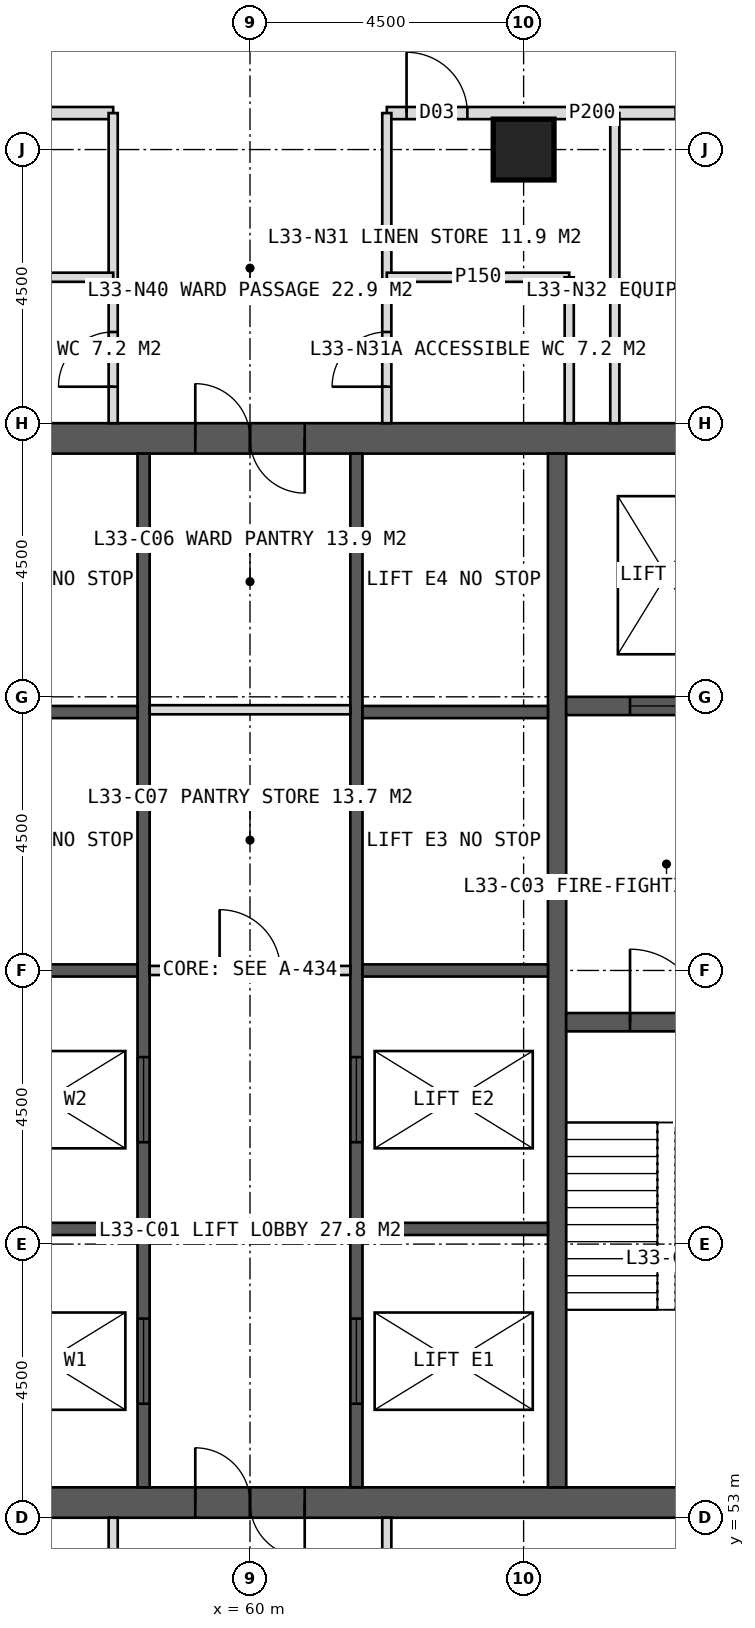
"""IFC4 building model, lengths in metres.
Left out: names, types, materials, properties, quantities, classifications, styles, units other than length and angle.
Written with IfcOpenShell. Run it as: python <this file> out.ifc"""

import sys

from ifc_helpers import new_model, si_unit, direction, frame, frame_2d, origin, origin_2d, place, context, subcontext, project, spatial, rectangle, hollow_rectangle, extrude, element, fill, save


model = new_model("IFC4")
c1 = context("Model", 3, precision=1e-05, world=origin(), true_north=direction((0.0, 1.0)))
c2 = subcontext(c1, "Body", "Model", "MODEL_VIEW")
j1 = project(units=[si_unit("LENGTHUNIT", "METRE"), si_unit("PLANEANGLEUNIT", "RADIAN")], contexts=[c1])
p1 = place(None, origin())
s1 = spatial("IfcSite", under=j1, at=p1, CompositionType="ELEMENT")
p2 = place(p1, origin())
s2 = spatial("IfcBuilding", under=s1, at=p2, CompositionType="ELEMENT")
p3 = place(p2, frame((0.0, 0.0, 140.0)))
s3 = spatial("IfcBuildingStorey", under=s2, at=p3, CompositionType="ELEMENT", Elevation=140.0)
p4 = place(p3, frame((51.0, 70.75, 0.0), z_axis=(0.0, 0.0, 1.0), x_axis=(1.0, 0.0, 0.0)))
e1 = element("IfcWall", 1, at=p4, inside=s3, PredefinedType="SHEAR", context=c2, shape_type="SweptSolid", body=[
    extrude(rectangle(XDim=18.0, YDim=0.5, at=frame_2d((9.0, 0.0))), origin(), (0.0, 0.0, 1.0), 4.0),
])
p5 = place(p4, frame((8.1, 0.0, 0.0)))
e2 = element("IfcOpeningElement", 2, at=p5, cuts=e1, PredefinedType="OPENING", context=c2, shape_type="SweptSolid", body=[
    extrude(rectangle(XDim=1.8, YDim=2.2, at=frame_2d((0.9, 1.1))), frame((0.0, 0.26, 0.0), z_axis=(0.0, -1.0, 0.0), x_axis=(1.0, 0.0, 0.0)), (0.0, 0.0, 1.0), 0.52),
])
p6 = place(p3, frame((51.0, 53.25, 0.0), z_axis=(0.0, 0.0, 1.0), x_axis=(1.0, 0.0, 0.0)))
e3 = element("IfcWall", 3, at=p6, inside=s3, PredefinedType="SHEAR", context=c2, shape_type="SweptSolid", body=[
    extrude(rectangle(XDim=18.0, YDim=0.5, at=frame_2d((9.0, 0.0))), origin(), (0.0, 0.0, 1.0), 4.0),
])
p7 = place(p6, frame((8.1, 0.0, 0.0)))
e4 = element("IfcOpeningElement", 4, at=p7, cuts=e3, PredefinedType="OPENING", context=c2, shape_type="SweptSolid", body=[
    extrude(rectangle(XDim=1.8, YDim=2.2, at=frame_2d((0.9, 1.1))), frame((0.0, 0.26, 0.0), z_axis=(0.0, -1.0, 0.0), x_axis=(1.0, 0.0, 0.0)), (0.0, 0.0, 1.0), 0.52),
])
p8 = place(p3, frame((65.05, 53.5, 0.0), z_axis=(0.0, 0.0, 1.0), x_axis=(0.0, 1.0, 0.0)))
e5 = element("IfcWall", 5, at=p8, inside=s3, PredefinedType="SHEAR", context=c2, shape_type="SweptSolid", body=[
    extrude(rectangle(XDim=17.0, YDim=0.3, at=frame_2d((8.5, 0.0))), origin(), (0.0, 0.0, 1.0), 4.0),
])
p9 = place(p3, frame((58.25, 53.5, 0.0), z_axis=(0.0, 0.0, 1.0), x_axis=(0.0, 1.0, 0.0)))
e6 = element("IfcWall", 6, at=p9, inside=s3, PredefinedType="SHEAR", context=c2, shape_type="SweptSolid", body=[
    extrude(rectangle(XDim=17.0, YDim=0.2, at=frame_2d((8.5, 0.0))), origin(), (0.0, 0.0, 1.0), 4.0),
])
p10 = place(p9, frame((1.375, 0.0, 0.0)))
e7 = element("IfcOpeningElement", 7, at=p10, cuts=e6, PredefinedType="OPENING", context=c2, shape_type="SweptSolid", body=[
    extrude(rectangle(XDim=1.4, YDim=2.2, at=frame_2d((0.7, 1.1))), frame((0.0, 0.11, 0.0), z_axis=(0.0, -1.0, 0.0), x_axis=(1.0, 0.0, 0.0)), (0.0, 0.0, 1.0), 0.22),
])
p11 = place(p9, frame((5.675, 0.0, 0.0)))
e8 = element("IfcOpeningElement", 8, at=p11, cuts=e6, PredefinedType="OPENING", context=c2, shape_type="SweptSolid", body=[
    extrude(rectangle(XDim=1.4, YDim=2.2, at=frame_2d((0.7, 1.1))), frame((0.0, 0.11, 0.0), z_axis=(0.0, -1.0, 0.0), x_axis=(1.0, 0.0, 0.0)), (0.0, 0.0, 1.0), 0.22),
])
p12 = place(p3, frame((61.75, 53.5, 0.0), z_axis=(0.0, 0.0, 1.0), x_axis=(0.0, 1.0, 0.0)))
e9 = element("IfcWall", 9, at=p12, inside=s3, PredefinedType="SHEAR", context=c2, shape_type="SweptSolid", body=[
    extrude(rectangle(XDim=17.0, YDim=0.2, at=frame_2d((8.5, 0.0))), origin(), (0.0, 0.0, 1.0), 4.0),
])
p13 = place(p12, frame((1.375, 0.0, 0.0)))
e10 = element("IfcOpeningElement", 10, at=p13, cuts=e9, PredefinedType="OPENING", context=c2, shape_type="SweptSolid", body=[
    extrude(rectangle(XDim=1.4, YDim=2.2, at=frame_2d((0.7, 1.1))), frame((0.0, 0.11, 0.0), z_axis=(0.0, -1.0, 0.0), x_axis=(1.0, 0.0, 0.0)), (0.0, 0.0, 1.0), 0.22),
])
p14 = place(p12, frame((5.675, 0.0, 0.0)))
e11 = element("IfcOpeningElement", 11, at=p14, cuts=e9, PredefinedType="OPENING", context=c2, shape_type="SweptSolid", body=[
    extrude(rectangle(XDim=1.4, YDim=2.2, at=frame_2d((0.7, 1.1))), frame((0.0, 0.11, 0.0), z_axis=(0.0, -1.0, 0.0), x_axis=(1.0, 0.0, 0.0)), (0.0, 0.0, 1.0), 0.22),
])
for number, where, z_axis, x_axis in (
    (12, (55.1, 57.75, 0.0), (0.0, 0.0, 1.0), (1.0, 0.0, 0.0)),
    (13, (61.85, 57.75, 0.0), (0.0, 0.0, 1.0), (1.0, 0.0, 0.0)),
    (14, (55.1, 62.0, 0.0), (0.0, 0.0, 1.0), (1.0, 0.0, 0.0)),
    (15, (61.85, 62.0, 0.0), (0.0, 0.0, 1.0), (1.0, 0.0, 0.0)),
    (16, (55.1, 66.25, 0.0), (0.0, 0.0, 1.0), (1.0, 0.0, 0.0)),
    (17, (61.85, 66.25, 0.0), (0.0, 0.0, 1.0), (1.0, 0.0, 0.0)),
):
    element("IfcWall", number, at=place(p3, frame(where, z_axis=z_axis, x_axis=x_axis)), inside=s3, PredefinedType="SHEAR", context=c2, shape_type="SweptSolid", body=[
        extrude(rectangle(XDim=3.05, YDim=0.2, at=frame_2d((1.525, 0.0))), origin(), (0.0, 0.0, 1.0), 4.0),
    ])
p15 = place(p3, frame((65.2, 61.15, 0.0), z_axis=(0.0, 0.0, 1.0), x_axis=(1.0, 0.0, 0.0)))
e18 = element("IfcWall", 18, at=p15, inside=s3, PredefinedType="SHEAR", context=c2, shape_type="SweptSolid", body=[
    extrude(rectangle(XDim=3.3, YDim=0.3, at=frame_2d((1.65, 0.0))), origin(), (0.0, 0.0, 1.0), 4.0),
])
p16 = place(p15, frame((1.05, 0.0, 0.0)))
e19 = element("IfcOpeningElement", 19, at=p16, cuts=e18, PredefinedType="OPENING", context=c2, shape_type="SweptSolid", body=[
    extrude(rectangle(XDim=1.2, YDim=2.1, at=frame_2d((0.6, 1.05))), frame((0.0, 0.16, 0.0), z_axis=(0.0, -1.0, 0.0), x_axis=(1.0, 0.0, 0.0)), (0.0, 0.0, 1.0), 0.32),
])
p17 = place(p3, frame((65.2, 66.35, 0.0), z_axis=(0.0, 0.0, 1.0), x_axis=(1.0, 0.0, 0.0)))
e20 = element("IfcWall", 20, at=p17, inside=s3, PredefinedType="SHEAR", context=c2, shape_type="SweptSolid", body=[
    extrude(rectangle(XDim=3.3, YDim=0.3, at=frame_2d((1.65, 0.0))), origin(), (0.0, 0.0, 1.0), 4.0),
])
p18 = place(p17, frame((1.05, 0.0, 0.0)))
e21 = element("IfcOpeningElement", 21, at=p18, cuts=e20, PredefinedType="OPENING", context=c2, shape_type="SweptSolid", body=[
    extrude(rectangle(XDim=1.2, YDim=2.2, at=frame_2d((0.6, 1.1))), frame((0.0, 0.16, 0.0), z_axis=(0.0, -1.0, 0.0), x_axis=(1.0, 0.0, 0.0)), (0.0, 0.0, 1.0), 0.32),
])
p19 = place(p3, frame((64.5, 75.5, 0.0), z_axis=(0.0, 0.0, 1.0), x_axis=(1.0, 0.0, 0.0)))
e22 = element("IfcColumn", 22, at=p19, inside=s3, PredefinedType="COLUMN", context=c2, shape_type="SweptSolid", body=[
    extrude(hollow_rectangle(XDim=1.0, YDim=1.0, WallThickness=0.1, at=origin_2d()), origin(), (0.0, 0.0, 1.0), 4.0),
])
p20 = place(p3, frame((45.9, 76.1, 0.0), z_axis=(0.0, 0.0, 1.0), x_axis=(1.0, 0.0, 0.0)))
e23 = element("IfcWall", 23, at=p20, inside=s3, PredefinedType="PARTITIONING", context=c2, shape_type="SweptSolid", body=[
    extrude(rectangle(XDim=11.85, YDim=0.2, at=frame_2d((5.925, 0.0))), origin(), (0.0, 0.0, 1.0), 3.75),
])
p21 = place(p20, frame((6.55, 0.0, 0.0)))
e24 = element("IfcOpeningElement", 24, at=p21, cuts=e23, PredefinedType="OPENING", context=c2, shape_type="SweptSolid", body=[
    extrude(rectangle(XDim=1.0, YDim=2.1, at=frame_2d((0.5, 1.05))), frame((0.0, 0.11, 0.0), z_axis=(0.0, -1.0, 0.0), x_axis=(1.0, 0.0, 0.0)), (0.0, 0.0, 1.0), 0.22),
])
p22 = place(p3, frame((62.25, 76.1, 0.0), z_axis=(0.0, 0.0, 1.0), x_axis=(1.0, 0.0, 0.0)))
e25 = element("IfcWall", 25, at=p22, inside=s3, PredefinedType="PARTITIONING", context=c2, shape_type="SweptSolid", body=[
    extrude(rectangle(XDim=6.75, YDim=0.2, at=frame_2d((3.375, 0.0))), origin(), (0.0, 0.0, 1.0), 3.75),
])
p23 = place(p22, frame((0.325, 0.0, 0.0)))
e26 = element("IfcOpeningElement", 26, at=p23, cuts=e25, PredefinedType="OPENING", context=c2, shape_type="SweptSolid", body=[
    extrude(rectangle(XDim=1.0, YDim=2.1, at=frame_2d((0.5, 1.05))), frame((0.0, 0.11, 0.0), z_axis=(0.0, -1.0, 0.0), x_axis=(1.0, 0.0, 0.0)), (0.0, 0.0, 1.0), 0.22),
])
p24 = place(p22, frame((4.75, 0.0, 0.0)))
e27 = element("IfcOpeningElement", 27, at=p24, cuts=e25, PredefinedType="OPENING", context=c2, shape_type="SweptSolid", body=[
    extrude(rectangle(XDim=1.0, YDim=2.1, at=frame_2d((0.5, 1.05))), frame((0.0, 0.11, 0.0), z_axis=(0.0, -1.0, 0.0), x_axis=(1.0, 0.0, 0.0)), (0.0, 0.0, 1.0), 0.22),
])
p25 = place(p3, frame((57.75, 71.0, 0.0), z_axis=(0.0, 0.0, 1.0), x_axis=(0.0, 1.0, 0.0)))
e28 = element("IfcWall", 28, at=p25, inside=s3, PredefinedType="PARTITIONING", context=c2, shape_type="SweptSolid", body=[
    extrude(rectangle(XDim=5.1, YDim=0.15, at=frame_2d((2.55, 0.0))), origin(), (0.0, 0.0, 1.0), 3.75),
])
p26 = place(p25, frame((0.6, 0.0, 0.0)))
e29 = element("IfcOpeningElement", 29, at=p26, cuts=e28, PredefinedType="OPENING", context=c2, shape_type="SweptSolid", body=[
    extrude(rectangle(XDim=0.9, YDim=2.1, at=frame_2d((0.45, 1.05))), frame((0.0, 0.085, 0.0), z_axis=(0.0, -1.0, 0.0), x_axis=(1.0, 0.0, 0.0)), (0.0, 0.0, 1.0), 0.17),
])
p27 = place(p3, frame((62.25, 71.0, 0.0), z_axis=(0.0, 0.0, 1.0), x_axis=(0.0, 1.0, 0.0)))
e30 = element("IfcWall", 30, at=p27, inside=s3, PredefinedType="PARTITIONING", context=c2, shape_type="SweptSolid", body=[
    extrude(rectangle(XDim=5.1, YDim=0.15, at=frame_2d((2.55, 0.0))), origin(), (0.0, 0.0, 1.0), 3.75),
])
p28 = place(p27, frame((0.6, 0.0, 0.0)))
e31 = element("IfcOpeningElement", 31, at=p28, cuts=e30, PredefinedType="OPENING", context=c2, shape_type="SweptSolid", body=[
    extrude(rectangle(XDim=0.9, YDim=2.1, at=frame_2d((0.45, 1.05))), frame((0.0, 0.085, 0.0), z_axis=(0.0, -1.0, 0.0), x_axis=(1.0, 0.0, 0.0)), (0.0, 0.0, 1.0), 0.17),
])
p29 = place(p3, frame((66.0, 71.0, 0.0), z_axis=(0.0, 0.0, 1.0), x_axis=(0.0, 1.0, 0.0)))
e32 = element("IfcWall", 32, at=p29, inside=s3, PredefinedType="PARTITIONING", context=c2, shape_type="SweptSolid", body=[
    extrude(rectangle(XDim=5.1, YDim=0.15, at=frame_2d((2.55, 0.0))), origin(), (0.0, 0.0, 1.0), 3.75),
])
for number, where, z_axis, x_axis in (
    (33, (54.75, 73.4, 0.0), (0.0, 0.0, 1.0), (1.0, 0.0, 0.0)),
    (34, (62.25, 73.4, 0.0), (0.0, 0.0, 1.0), (1.0, 0.0, 0.0)),
):
    element("IfcWall", number, at=place(p3, frame(where, z_axis=z_axis, x_axis=x_axis)), inside=s3, PredefinedType="PARTITIONING", context=c2, shape_type="SweptSolid", body=[
        extrude(rectangle(XDim=3.0, YDim=0.15, at=frame_2d((1.5, 0.0))), origin(), (0.0, 0.0, 1.0), 3.75),
    ])
p30 = place(p3, frame((65.25, 71.0, 0.0), z_axis=(0.0, 0.0, 1.0), x_axis=(0.0, 1.0, 0.0)))
e35 = element("IfcWall", 35, at=p30, inside=s3, PredefinedType="PARTITIONING", context=c2, shape_type="SweptSolid", body=[
    extrude(rectangle(XDim=2.4, YDim=0.15, at=frame_2d((1.2, 0.0))), origin(), (0.0, 0.0, 1.0), 3.75),
])
for number, where, z_axis, x_axis in (
    (36, (62.25, 53.0, 0.0), (0.0, 0.0, 1.0), (0.0, -1.0, 0.0)),
    (37, (57.75, 53.0, 0.0), (0.0, 0.0, 1.0), (0.0, -1.0, 0.0)),
):
    element("IfcWall", number, at=place(p3, frame(where, z_axis=z_axis, x_axis=x_axis)), inside=s3, PredefinedType="PARTITIONING", context=c2, shape_type="SweptSolid", body=[
        extrude(rectangle(XDim=5.1, YDim=0.15, at=frame_2d((2.55, 0.0))), origin(), (0.0, 0.0, 1.0), 3.75),
    ])
p31 = place(p3, frame((58.35, 62.0, 0.0), z_axis=(0.0, 0.0, 1.0), x_axis=(1.0, 0.0, 0.0)))
e38 = element("IfcWall", 38, at=p31, inside=s3, PredefinedType="PARTITIONING", context=c2, shape_type="SweptSolid", body=[
    extrude(rectangle(XDim=3.3, YDim=0.15, at=frame_2d((1.65, 0.0))), origin(), (0.0, 0.0, 1.0), 3.75),
])
p32 = place(p31, frame((1.15, 0.0, 0.0)))
e39 = element("IfcOpeningElement", 39, at=p32, cuts=e38, PredefinedType="OPENING", context=c2, shape_type="SweptSolid", body=[
    extrude(rectangle(XDim=1.0, YDim=2.1, at=frame_2d((0.5, 1.05))), frame((0.0, 0.085, 0.0), z_axis=(0.0, -1.0, 0.0), x_axis=(1.0, 0.0, 0.0)), (0.0, 0.0, 1.0), 0.17),
])
p33 = place(p3, frame((58.35, 66.288, 0.0), z_axis=(0.0, 0.0, 1.0), x_axis=(1.0, 0.0, 0.0)))
e40 = element("IfcWall", 40, at=p33, inside=s3, PredefinedType="PARTITIONING", context=c2, shape_type="SweptSolid", body=[
    extrude(rectangle(XDim=3.3, YDim=0.15, at=frame_2d((1.65, 0.0))), origin(), (0.0, 0.0, 1.0), 3.75),
])
p34 = place(p26, origin())
e41 = element("IfcDoor", 41, at=p34, inside=s3, OperationType="SINGLE_SWING_LEFT", PredefinedType="DOOR", context=c2, shape_type="SweptSolid", body=[
    extrude(rectangle(XDim=0.9, YDim=2.1, at=frame_2d((0.45, 1.05))), frame((0.0, 0.025, 0.0), z_axis=(0.0, -1.0, 0.0), x_axis=(1.0, 0.0, 0.0)), (0.0, 0.0, 1.0), 0.05),
])
fill(e29, e41)
p35 = place(p28, origin())
e42 = element("IfcDoor", 42, at=p35, inside=s3, OperationType="SINGLE_SWING_LEFT", PredefinedType="DOOR", context=c2, shape_type="SweptSolid", body=[
    extrude(rectangle(XDim=0.9, YDim=2.1, at=frame_2d((0.45, 1.05))), frame((0.0, 0.025, 0.0), z_axis=(0.0, -1.0, 0.0), x_axis=(1.0, 0.0, 0.0)), (0.0, 0.0, 1.0), 0.05),
])
fill(e31, e42)
p36 = place(p23, origin())
e43 = element("IfcDoor", 43, at=p36, inside=s3, OperationType="SINGLE_SWING_LEFT", PredefinedType="DOOR", context=c2, shape_type="SweptSolid", body=[
    extrude(rectangle(XDim=1.0, YDim=2.1, at=frame_2d((0.5, 1.05))), frame((0.0, 0.025, 0.0), z_axis=(0.0, -1.0, 0.0), x_axis=(1.0, 0.0, 0.0)), (0.0, 0.0, 1.0), 0.05),
])
fill(e26, e43)
p37 = place(p7, origin())
e44 = element("IfcDoor", 44, at=p37, inside=s3, OperationType="DOUBLE_DOOR_SINGLE_SWING", PredefinedType="DOOR", context=c2, shape_type="SweptSolid", body=[
    extrude(rectangle(XDim=1.8, YDim=2.2, at=frame_2d((0.9, 1.1))), frame((0.0, 0.025, 0.0), z_axis=(0.0, -1.0, 0.0), x_axis=(1.0, 0.0, 0.0)), (0.0, 0.0, 1.0), 0.05),
])
fill(e4, e44)
p38 = place(p16, origin())
e45 = element("IfcDoor", 45, at=p38, inside=s3, OperationType="SINGLE_SWING_LEFT", PredefinedType="DOOR", context=c2, shape_type="SweptSolid", body=[
    extrude(rectangle(XDim=1.2, YDim=2.1, at=frame_2d((0.6, 1.05))), frame((0.0, 0.025, 0.0), z_axis=(0.0, -1.0, 0.0), x_axis=(1.0, 0.0, 0.0)), (0.0, 0.0, 1.0), 0.05),
])
fill(e19, e45)
p39 = place(p18, origin())
e46 = element("IfcDoor", 46, at=p39, inside=s3, OperationType="SLIDING_TO_LEFT", PredefinedType="DOOR", context=c2, shape_type="SweptSolid", body=[
    extrude(rectangle(XDim=1.2, YDim=2.2, at=frame_2d((0.6, 1.1))), frame((0.0, 0.025, 0.0), z_axis=(0.0, -1.0, 0.0), x_axis=(1.0, 0.0, 0.0)), (0.0, 0.0, 1.0), 0.05),
])
fill(e21, e46)
p40 = place(p10, origin())
e47 = element("IfcDoor", 47, at=p40, inside=s3, OperationType="SLIDING_TO_LEFT", PredefinedType="DOOR", context=c2, shape_type="SweptSolid", body=[
    extrude(rectangle(XDim=1.4, YDim=2.2, at=frame_2d((0.7, 1.1))), frame((0.0, 0.025, 0.0), z_axis=(0.0, -1.0, 0.0), x_axis=(1.0, 0.0, 0.0)), (0.0, 0.0, 1.0), 0.05),
])
fill(e7, e47)
p41 = place(p13, origin())
e48 = element("IfcDoor", 48, at=p41, inside=s3, OperationType="SLIDING_TO_LEFT", PredefinedType="DOOR", context=c2, shape_type="SweptSolid", body=[
    extrude(rectangle(XDim=1.4, YDim=2.2, at=frame_2d((0.7, 1.1))), frame((0.0, 0.025, 0.0), z_axis=(0.0, -1.0, 0.0), x_axis=(1.0, 0.0, 0.0)), (0.0, 0.0, 1.0), 0.05),
])
fill(e10, e48)
p42 = place(p11, origin())
e49 = element("IfcDoor", 49, at=p42, inside=s3, OperationType="SLIDING_TO_LEFT", PredefinedType="DOOR", context=c2, shape_type="SweptSolid", body=[
    extrude(rectangle(XDim=1.4, YDim=2.2, at=frame_2d((0.7, 1.1))), frame((0.0, 0.025, 0.0), z_axis=(0.0, -1.0, 0.0), x_axis=(1.0, 0.0, 0.0)), (0.0, 0.0, 1.0), 0.05),
])
fill(e8, e49)
p43 = place(p14, origin())
e50 = element("IfcDoor", 50, at=p43, inside=s3, OperationType="SLIDING_TO_LEFT", PredefinedType="DOOR", context=c2, shape_type="SweptSolid", body=[
    extrude(rectangle(XDim=1.4, YDim=2.2, at=frame_2d((0.7, 1.1))), frame((0.0, 0.025, 0.0), z_axis=(0.0, -1.0, 0.0), x_axis=(1.0, 0.0, 0.0)), (0.0, 0.0, 1.0), 0.05),
])
fill(e11, e50)
p44 = place(p32, origin())
e51 = element("IfcDoor", 51, at=p44, inside=s3, OperationType="SINGLE_SWING_LEFT", PredefinedType="DOOR", context=c2, shape_type="SweptSolid", body=[
    extrude(rectangle(XDim=1.0, YDim=2.1, at=frame_2d((0.5, 1.05))), frame((0.0, 0.025, 0.0), z_axis=(0.0, -1.0, 0.0), x_axis=(1.0, 0.0, 0.0)), (0.0, 0.0, 1.0), 0.05),
])
fill(e39, e51)
p45 = place(p5, origin())
e52 = element("IfcDoor", 52, at=p45, inside=s3, OperationType="DOUBLE_DOOR_SINGLE_SWING", PredefinedType="DOOR", context=c2, shape_type="SweptSolid", body=[
    extrude(rectangle(XDim=1.8, YDim=2.2, at=frame_2d((0.9, 1.1))), frame((0.0, 0.025, 0.0), z_axis=(0.0, -1.0, 0.0), x_axis=(1.0, 0.0, 0.0)), (0.0, 0.0, 1.0), 0.05),
])
fill(e2, e52)
save(model, sys.argv[1])
